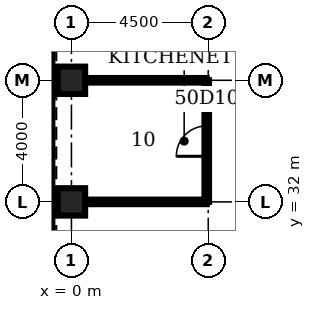
"""IFC4 building model, lengths in metres.
Left out: names, types, materials, properties, quantities, classifications, styles, units other than length and angle.
Written with IfcOpenShell. Run it as: python <this file> out.ifc"""

import sys

from ifc_helpers import new_model, si_unit, direction, frame, frame_2d, origin, origin_2d, place, context, subcontext, project, spatial, rectangle, hollow_rectangle, extrude, element, fill, save


model = new_model("IFC4")
c1 = context("Model", 3, precision=1e-05, world=origin(), true_north=direction((0.0, 1.0)))
c2 = subcontext(c1, "Body", "Model", "MODEL_VIEW")
j1 = project(units=[si_unit("LENGTHUNIT", "METRE"), si_unit("PLANEANGLEUNIT", "RADIAN")], contexts=[c1])
p1 = place(None, origin())
s1 = spatial("IfcSite", under=j1, at=p1, CompositionType="ELEMENT")
p2 = place(p1, origin())
s2 = spatial("IfcBuilding", under=s1, at=p2, CompositionType="ELEMENT")
p3 = place(p2, frame((0.0, 0.0, 223.6)))
s3 = spatial("IfcBuildingStorey", under=s2, at=p3, CompositionType="ELEMENT", Elevation=223.6)
for number, where, z_axis, x_axis in (
    (1, (0.0, 36.0, 0.0), (0.0, 0.0, 1.0), (1.0, 0.0, 0.0)),
    (2, (0.0, 32.0, 0.0), (0.0, 0.0, 1.0), (1.0, 0.0, 0.0)),
):
    element("IfcColumn", number, at=place(p3, frame(where, z_axis=z_axis, x_axis=x_axis)), inside=s3, PredefinedType="COLUMN", context=c2, shape_type="SweptSolid", body=[
        extrude(hollow_rectangle(XDim=0.9, YDim=0.9, WallThickness=0.08, at=origin_2d()), origin(), (0.0, 0.0, 1.0), 4.2),
    ])
for number, where, z_axis, x_axis in (
    (3, (0.45, 32.0, 0.0), (0.0, 0.0, 1.0), (1.0, 0.0, 0.0)),
    (4, (0.45, 36.0, 0.0), (0.0, 0.0, 1.0), (1.0, 0.0, 0.0)),
):
    element("IfcWall", number, at=place(p3, frame(where, z_axis=z_axis, x_axis=x_axis)), inside=s3, PredefinedType="PARTITIONING", context=c2, shape_type="SweptSolid", body=[
        extrude(rectangle(XDim=4.0, YDim=0.15, at=frame_2d((2.0, 0.0))), origin(), (0.0, 0.0, 1.0), 3.0),
    ])
p4 = place(p3, frame((4.45, 32.0, 0.0), z_axis=(0.0, 0.0, 1.0), x_axis=(0.0, 1.0, 0.0)))
e5 = element("IfcWall", 5, at=p4, inside=s3, PredefinedType="PARTITIONING", context=c2, shape_type="SweptSolid", body=[
    extrude(rectangle(XDim=4.0, YDim=0.15, at=frame_2d((2.0, 0.0))), origin(), (0.0, 0.0, 1.0), 3.0),
])
p5 = place(p4, frame((1.5, 0.0, 0.0)))
e6 = element("IfcOpeningElement", 6, at=p5, cuts=e5, PredefinedType="OPENING", context=c2, shape_type="SweptSolid", body=[
    extrude(rectangle(XDim=1.0, YDim=2.1, at=frame_2d((0.5, 1.05))), frame((0.0, 0.085, 0.0), z_axis=(0.0, -1.0, 0.0), x_axis=(1.0, 0.0, 0.0)), (0.0, 0.0, 1.0), 0.17),
])
p6 = place(p5, origin())
e7 = element("IfcDoor", 7, at=p6, inside=s3, OperationType="SINGLE_SWING_LEFT", PredefinedType="DOOR", context=c2, shape_type="SweptSolid", body=[
    extrude(rectangle(XDim=1.0, YDim=2.1, at=frame_2d((0.5, 1.05))), frame((0.0, 0.025, 0.0), z_axis=(0.0, -1.0, 0.0), x_axis=(1.0, 0.0, 0.0)), (0.0, 0.0, 1.0), 0.05),
])
fill(e6, e7)
save(model, sys.argv[1])
